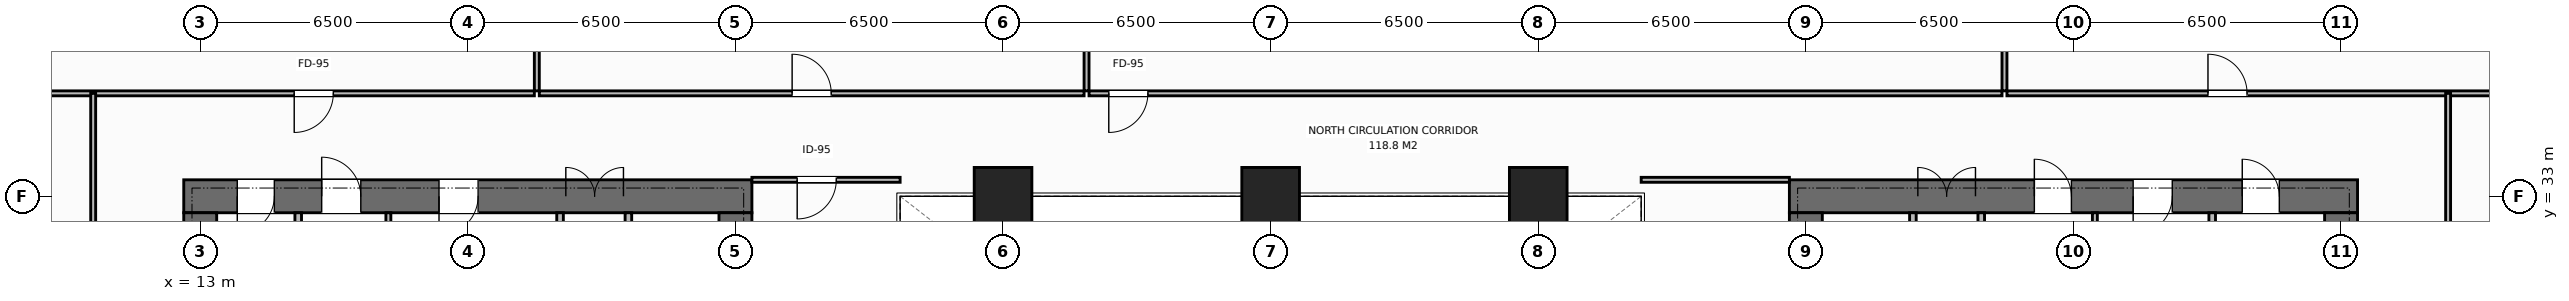
"""IFC4 building model, lengths in metres.
Left out: names, types, materials, properties, quantities, classifications, styles, units other than length and angle.
Written with IfcOpenShell. Run it as: python <this file> out.ifc"""

import sys

from ifc_helpers import new_model, si_unit, direction, frame, frame_2d, origin, origin_2d, place, context, subcontext, project, spatial, rectangle, extrude, element, fill, save


model = new_model("IFC4")
c1 = context("Model", 3, precision=1e-05, world=origin(), true_north=direction((0.0, 1.0)))
c2 = subcontext(c1, "Body", "Model", "MODEL_VIEW")
j1 = project(units=[si_unit("LENGTHUNIT", "METRE"), si_unit("PLANEANGLEUNIT", "RADIAN")], contexts=[c1])
p1 = place(None, origin())
s1 = spatial("IfcSite", under=j1, at=p1, CompositionType="ELEMENT")
p2 = place(p1, origin())
s2 = spatial("IfcBuilding", under=s1, at=p2, CompositionType="ELEMENT")
p3 = place(p2, frame((0.0, 0.0, 65.8)))
s3 = spatial("IfcBuildingStorey", under=s2, at=p3, CompositionType="ELEMENT", Elevation=65.8)
p4 = place(p3, frame((12.6, 33.0, 0.0), z_axis=(0.0, 0.0, 1.0), x_axis=(1.0, 0.0, 0.0)))
e1 = element("IfcWall", 1, at=p4, inside=s3, PredefinedType="SHEAR", context=c2, shape_type="SweptSolid", body=[
    extrude(rectangle(XDim=13.8, YDim=0.8, at=frame_2d((6.9, 0.0))), origin(), (0.0, 0.0, 1.0), 3.8),
])
p5 = place(p4, frame((1.3, 0.0, 0.0)))
e2 = element("IfcOpeningElement", 2, at=p5, cuts=e1, PredefinedType="OPENING", context=c2, shape_type="SweptSolid", body=[
    extrude(rectangle(XDim=0.9, YDim=2.15, at=frame_2d((0.45, 1.075))), frame((0.0, 0.41, 0.0), z_axis=(0.0, -1.0, 0.0), x_axis=(1.0, 0.0, 0.0)), (0.0, 0.0, 1.0), 0.82),
])
p6 = place(p4, frame((3.35, 0.0, 0.0)))
e3 = element("IfcOpeningElement", 3, at=p6, cuts=e1, PredefinedType="OPENING", context=c2, shape_type="SweptSolid", body=[
    extrude(rectangle(XDim=0.95, YDim=2.15, at=frame_2d((0.475, 1.075))), frame((0.0, 0.41, 0.0), z_axis=(0.0, -1.0, 0.0), x_axis=(1.0, 0.0, 0.0)), (0.0, 0.0, 1.0), 0.82),
])
p7 = place(p4, frame((6.2, 0.0, 0.0)))
e4 = element("IfcOpeningElement", 4, at=p7, cuts=e1, PredefinedType="OPENING", context=c2, shape_type="SweptSolid", body=[
    extrude(rectangle(XDim=0.95, YDim=2.15, at=frame_2d((0.475, 1.075))), frame((0.0, 0.41, 0.0), z_axis=(0.0, -1.0, 0.0), x_axis=(1.0, 0.0, 0.0)), (0.0, 0.0, 1.0), 0.82),
])
p8 = place(p4, frame((9.28, 0.0, 0.0)))
e5 = element("IfcOpeningElement", 5, at=p8, cuts=e1, PredefinedType="OPENING", context=c2, shape_type="SweptSolid", body=[
    extrude(rectangle(XDim=1.4, YDim=2.2, at=frame_2d((0.7, 1.1))), frame((0.0, 0.41, 0.0), z_axis=(0.0, -1.0, 0.0), x_axis=(1.0, 0.0, 0.0)), (0.0, 0.0, 1.0), 0.82),
])
p9 = place(p3, frame((13.0, 19.4, 0.0), z_axis=(0.0, 0.0, 1.0), x_axis=(0.0, 1.0, 0.0)))
e6 = element("IfcWall", 6, at=p9, inside=s3, PredefinedType="SHEAR", context=c2, shape_type="SweptSolid", body=[
    extrude(rectangle(XDim=13.2, YDim=0.8, at=frame_2d((6.6, 0.0))), origin(), (0.0, 0.0, 1.0), 3.8),
])
p10 = place(p9, frame((4.65, 0.0, 0.0)))
e7 = element("IfcOpeningElement", 7, at=p10, cuts=e6, PredefinedType="OPENING", context=c2, shape_type="SweptSolid", body=[
    extrude(rectangle(XDim=1.4, YDim=2.2, at=frame_2d((0.7, 1.1))), frame((0.0, 0.41, 0.0), z_axis=(0.0, -1.0, 0.0), x_axis=(1.0, 0.0, 0.0)), (0.0, 0.0, 1.0), 0.82),
])
p11 = place(p3, frame((26.0, 19.4, 0.0), z_axis=(0.0, 0.0, 1.0), x_axis=(0.0, 1.0, 0.0)))
e8 = element("IfcWall", 8, at=p11, inside=s3, PredefinedType="SHEAR", context=c2, shape_type="SweptSolid", body=[
    extrude(rectangle(XDim=13.2, YDim=0.8, at=frame_2d((6.6, 0.0))), origin(), (0.0, 0.0, 1.0), 3.8),
])
p12 = place(p3, frame((51.6, 33.0, 0.0), z_axis=(0.0, 0.0, 1.0), x_axis=(1.0, 0.0, 0.0)))
e9 = element("IfcWall", 9, at=p12, inside=s3, PredefinedType="SHEAR", context=c2, shape_type="SweptSolid", body=[
    extrude(rectangle(XDim=13.8, YDim=0.8, at=frame_2d((6.9, 0.0))), origin(), (0.0, 0.0, 1.0), 3.8),
])
p13 = place(p12, frame((3.12, 0.0, 0.0)))
e10 = element("IfcOpeningElement", 10, at=p13, cuts=e9, PredefinedType="OPENING", context=c2, shape_type="SweptSolid", body=[
    extrude(rectangle(XDim=1.4, YDim=2.2, at=frame_2d((0.7, 1.1))), frame((0.0, 0.41, 0.0), z_axis=(0.0, -1.0, 0.0), x_axis=(1.0, 0.0, 0.0)), (0.0, 0.0, 1.0), 0.82),
])
p14 = place(p12, frame((11.0, 0.0, 0.0)))
e11 = element("IfcOpeningElement", 11, at=p14, cuts=e9, PredefinedType="OPENING", context=c2, shape_type="SweptSolid", body=[
    extrude(rectangle(XDim=0.9, YDim=2.15, at=frame_2d((0.45, 1.075))), frame((0.0, 0.41, 0.0), z_axis=(0.0, -1.0, 0.0), x_axis=(1.0, 0.0, 0.0)), (0.0, 0.0, 1.0), 0.82),
])
p15 = place(p12, frame((5.95, 0.0, 0.0)))
e12 = element("IfcOpeningElement", 12, at=p15, cuts=e9, PredefinedType="OPENING", context=c2, shape_type="SweptSolid", body=[
    extrude(rectangle(XDim=0.9, YDim=2.15, at=frame_2d((0.45, 1.075))), frame((0.0, 0.41, 0.0), z_axis=(0.0, -1.0, 0.0), x_axis=(1.0, 0.0, 0.0)), (0.0, 0.0, 1.0), 0.82),
])
p16 = place(p12, frame((8.35, 0.0, 0.0)))
e13 = element("IfcOpeningElement", 13, at=p16, cuts=e9, PredefinedType="OPENING", context=c2, shape_type="SweptSolid", body=[
    extrude(rectangle(XDim=0.95, YDim=2.15, at=frame_2d((0.475, 1.075))), frame((0.0, 0.41, 0.0), z_axis=(0.0, -1.0, 0.0), x_axis=(1.0, 0.0, 0.0)), (0.0, 0.0, 1.0), 0.82),
])
p17 = place(p3, frame((52.0, 19.4, 0.0), z_axis=(0.0, 0.0, 1.0), x_axis=(0.0, 1.0, 0.0)))
e14 = element("IfcWall", 14, at=p17, inside=s3, PredefinedType="SHEAR", context=c2, shape_type="SweptSolid", body=[
    extrude(rectangle(XDim=13.2, YDim=0.8, at=frame_2d((6.6, 0.0))), origin(), (0.0, 0.0, 1.0), 3.8),
])
p18 = place(p3, frame((65.0, 19.4, 0.0), z_axis=(0.0, 0.0, 1.0), x_axis=(0.0, 1.0, 0.0)))
e15 = element("IfcWall", 15, at=p18, inside=s3, PredefinedType="SHEAR", context=c2, shape_type="SweptSolid", body=[
    extrude(rectangle(XDim=13.2, YDim=0.8, at=frame_2d((6.6, 0.0))), origin(), (0.0, 0.0, 1.0), 3.8),
])
p19 = place(p18, frame((8.05, 0.0, 0.0)))
e16 = element("IfcOpeningElement", 16, at=p19, cuts=e15, PredefinedType="OPENING", context=c2, shape_type="SweptSolid", body=[
    extrude(rectangle(XDim=1.3, YDim=2.2, at=frame_2d((0.65, 1.1))), frame((0.0, 0.41, 0.0), z_axis=(0.0, -1.0, 0.0), x_axis=(1.0, 0.0, 0.0)), (0.0, 0.0, 1.0), 0.82),
])
for number, where, z_axis, x_axis in (
    (17, (32.5, 33.0, 0.0), (0.0, 0.0, 1.0), (1.0, 0.0, 0.0)),
    (18, (39.0, 33.0, 0.0), (0.0, 0.0, 1.0), (1.0, 0.0, 0.0)),
    (19, (45.5, 33.0, 0.0), (0.0, 0.0, 1.0), (1.0, 0.0, 0.0)),
):
    element("IfcColumn", number, at=place(p3, frame(where, z_axis=z_axis, x_axis=x_axis)), inside=s3, PredefinedType="COLUMN", context=c2, shape_type="SweptSolid", body=[
        extrude(rectangle(XDim=1.4, YDim=1.4, at=origin_2d()), origin(), (0.0, 0.0, 1.0), 3.8),
    ])
p20 = place(p3, frame((15.38, 26.56, 0.0), z_axis=(0.0, 0.0, 1.0), x_axis=(0.0, 1.0, 0.0)))
e20 = element("IfcWall", 20, at=p20, inside=s3, PredefinedType="STANDARD", context=c2, shape_type="SweptSolid", body=[
    extrude(rectangle(XDim=6.04, YDim=0.16, at=frame_2d((3.02, 0.0))), origin(), (0.0, 0.0, 1.0), 3.55),
])
p21 = place(p3, frame((17.57, 26.56, 0.0), z_axis=(0.0, 0.0, 1.0), x_axis=(0.0, 1.0, 0.0)))
e21 = element("IfcWall", 21, at=p21, inside=s3, PredefinedType="PARTITIONING", context=c2, shape_type="SweptSolid", body=[
    extrude(rectangle(XDim=6.04, YDim=0.12, at=frame_2d((3.02, 0.0))), origin(), (0.0, 0.0, 1.0), 3.55),
])
p22 = place(p3, frame((21.74, 26.56, 0.0), z_axis=(0.0, 0.0, 1.0), x_axis=(0.0, 1.0, 0.0)))
e22 = element("IfcWall", 22, at=p22, inside=s3, PredefinedType="STANDARD", context=c2, shape_type="SweptSolid", body=[
    extrude(rectangle(XDim=6.04, YDim=0.16, at=frame_2d((3.02, 0.0))), origin(), (0.0, 0.0, 1.0), 3.55),
])
p23 = place(p3, frame((23.4, 19.4, 0.0), z_axis=(0.0, 0.0, 1.0), x_axis=(0.0, 1.0, 0.0)))
e23 = element("IfcWall", 23, at=p23, inside=s3, PredefinedType="STANDARD", context=c2, shape_type="SweptSolid", body=[
    extrude(rectangle(XDim=13.2, YDim=0.16, at=frame_2d((6.6, 0.0))), origin(), (0.0, 0.0, 1.0), 3.55),
])
p24 = place(p23, frame((0.55, 0.0, 0.0)))
e24 = element("IfcOpeningElement", 24, at=p24, cuts=e23, PredefinedType="OPENING", context=c2, shape_type="SweptSolid", body=[
    extrude(rectangle(XDim=1.1, YDim=2.2, at=frame_2d((0.55, 1.1))), frame((0.0, 0.09, 0.0), z_axis=(0.0, -1.0, 0.0), x_axis=(1.0, 0.0, 0.0)), (0.0, 0.0, 1.0), 0.18),
])
p25 = place(p23, frame((2.7, 0.0, 0.0)))
e25 = element("IfcOpeningElement", 25, at=p25, cuts=e23, PredefinedType="OPENING", context=c2, shape_type="SweptSolid", body=[
    extrude(rectangle(XDim=1.1, YDim=2.2, at=frame_2d((0.55, 1.1))), frame((0.0, 0.09, 0.0), z_axis=(0.0, -1.0, 0.0), x_axis=(1.0, 0.0, 0.0)), (0.0, 0.0, 1.0), 0.18),
])
p26 = place(p3, frame((54.6, 19.4, 0.0), z_axis=(0.0, 0.0, 1.0), x_axis=(0.0, 1.0, 0.0)))
e26 = element("IfcWall", 26, at=p26, inside=s3, PredefinedType="STANDARD", context=c2, shape_type="SweptSolid", body=[
    extrude(rectangle(XDim=13.2, YDim=0.16, at=frame_2d((6.6, 0.0))), origin(), (0.0, 0.0, 1.0), 3.55),
])
p27 = place(p26, frame((0.55, 0.0, 0.0)))
e27 = element("IfcOpeningElement", 27, at=p27, cuts=e26, PredefinedType="OPENING", context=c2, shape_type="SweptSolid", body=[
    extrude(rectangle(XDim=1.1, YDim=2.2, at=frame_2d((0.55, 1.1))), frame((0.0, 0.09, 0.0), z_axis=(0.0, -1.0, 0.0), x_axis=(1.0, 0.0, 0.0)), (0.0, 0.0, 1.0), 0.18),
])
p28 = place(p26, frame((2.7, 0.0, 0.0)))
e28 = element("IfcOpeningElement", 28, at=p28, cuts=e26, PredefinedType="OPENING", context=c2, shape_type="SweptSolid", body=[
    extrude(rectangle(XDim=1.1, YDim=2.2, at=frame_2d((0.55, 1.1))), frame((0.0, 0.09, 0.0), z_axis=(0.0, -1.0, 0.0), x_axis=(1.0, 0.0, 0.0)), (0.0, 0.0, 1.0), 0.18),
])
p29 = place(p3, frame((56.26, 23.09, 0.0), z_axis=(0.0, 0.0, 1.0), x_axis=(0.0, 1.0, 0.0)))
e29 = element("IfcWall", 29, at=p29, inside=s3, PredefinedType="STANDARD", context=c2, shape_type="SweptSolid", body=[
    extrude(rectangle(XDim=9.51, YDim=0.16, at=frame_2d((4.755, 0.0))), origin(), (0.0, 0.0, 1.0), 3.55),
])
p30 = place(p29, frame((1.01, 0.0, 0.0)))
e30 = element("IfcOpeningElement", 30, at=p30, cuts=e29, PredefinedType="OPENING", context=c2, shape_type="SweptSolid", body=[
    extrude(rectangle(XDim=1.3, YDim=2.2, at=frame_2d((0.65, 1.1))), frame((0.0, 0.09, 0.0), z_axis=(0.0, -1.0, 0.0), x_axis=(1.0, 0.0, 0.0)), (0.0, 0.0, 1.0), 0.18),
])
p31 = place(p3, frame((61.87, 26.56, 0.0), z_axis=(0.0, 0.0, 1.0), x_axis=(0.0, 1.0, 0.0)))
e31 = element("IfcWall", 31, at=p31, inside=s3, PredefinedType="STANDARD", context=c2, shape_type="SweptSolid", body=[
    extrude(rectangle(XDim=6.04, YDim=0.16, at=frame_2d((3.02, 0.0))), origin(), (0.0, 0.0, 1.0), 3.55),
])
p32 = place(p3, frame((59.02, 26.56, 0.0), z_axis=(0.0, 0.0, 1.0), x_axis=(0.0, 1.0, 0.0)))
e32 = element("IfcWall", 32, at=p32, inside=s3, PredefinedType="PARTITIONING", context=c2, shape_type="SweptSolid", body=[
    extrude(rectangle(XDim=6.04, YDim=0.12, at=frame_2d((3.02, 0.0))), origin(), (0.0, 0.0, 1.0), 3.55),
])
p33 = place(p3, frame((26.4, 33.4, 0.0), z_axis=(0.0, 0.0, 1.0), x_axis=(1.0, 0.0, 0.0)))
e33 = element("IfcWall", 33, at=p33, inside=s3, PredefinedType="PARTITIONING", context=c2, shape_type="SweptSolid", body=[
    extrude(rectangle(XDim=3.6, YDim=0.12, at=frame_2d((1.8, 0.0))), origin(), (0.0, 0.0, 1.0), 3.55),
])
p34 = place(p33, frame((1.1, 0.0, 0.0)))
e34 = element("IfcOpeningElement", 34, at=p34, cuts=e33, PredefinedType="OPENING", context=c2, shape_type="SweptSolid", body=[
    extrude(rectangle(XDim=0.95, YDim=2.15, at=frame_2d((0.475, 1.075))), frame((0.0, 0.07, 0.0), z_axis=(0.0, -1.0, 0.0), x_axis=(1.0, 0.0, 0.0)), (0.0, 0.0, 1.0), 0.14),
])
p35 = place(p3, frame((48.0, 33.4, 0.0), z_axis=(0.0, 0.0, 1.0), x_axis=(1.0, 0.0, 0.0)))
e35 = element("IfcWall", 35, at=p35, inside=s3, PredefinedType="PARTITIONING", context=c2, shape_type="SweptSolid", body=[
    extrude(rectangle(XDim=3.6, YDim=0.12, at=frame_2d((1.8, 0.0))), origin(), (0.0, 0.0, 1.0), 3.55),
])
p36 = place(p3, frame((21.176, 35.56, 0.0), z_axis=(0.0, 0.0, 1.0), x_axis=(0.0, 1.0, 0.0)))
e36 = element("IfcWall", 36, at=p36, inside=s3, PredefinedType="PARTITIONING", context=c2, shape_type="SweptSolid", body=[
    extrude(rectangle(XDim=16.42, YDim=0.12, at=frame_2d((8.21, 0.0))), origin(), (0.0, 0.0, 1.0), 3.55),
])
p37 = place(p3, frame((-0.02, 35.5, 0.0), z_axis=(0.0, 0.0, 1.0), x_axis=(1.0, 0.0, 0.0)))
e37 = element("IfcWall", 37, at=p37, inside=s3, PredefinedType="PARTITIONING", context=c2, shape_type="SweptSolid", body=[
    extrude(rectangle(XDim=21.136, YDim=0.12, at=frame_2d((10.568, 0.0))), origin(), (0.0, 0.0, 1.0), 3.55),
])
p38 = place(p37, frame((15.303, 0.0, 0.0)))
e38 = element("IfcOpeningElement", 38, at=p38, cuts=e37, PredefinedType="OPENING", context=c2, shape_type="SweptSolid", body=[
    extrude(rectangle(XDim=0.95, YDim=2.15, at=frame_2d((0.475, 1.075))), frame((0.0, 0.07, 0.0), z_axis=(0.0, -1.0, 0.0), x_axis=(1.0, 0.0, 0.0)), (0.0, 0.0, 1.0), 0.14),
])
p39 = place(p3, frame((34.528, 35.56, 0.0), z_axis=(0.0, 0.0, 1.0), x_axis=(0.0, 1.0, 0.0)))
e39 = element("IfcWall", 39, at=p39, inside=s3, PredefinedType="PARTITIONING", context=c2, shape_type="SweptSolid", body=[
    extrude(rectangle(XDim=16.42, YDim=0.12, at=frame_2d((8.21, 0.0))), origin(), (0.0, 0.0, 1.0), 3.55),
])
p40 = place(p3, frame((21.236, 35.5, 0.0), z_axis=(0.0, 0.0, 1.0), x_axis=(1.0, 0.0, 0.0)))
e40 = element("IfcWall", 40, at=p40, inside=s3, PredefinedType="PARTITIONING", context=c2, shape_type="SweptSolid", body=[
    extrude(rectangle(XDim=13.233, YDim=0.12, at=frame_2d((6.616, 0.0))), origin(), (0.0, 0.0, 1.0), 3.55),
])
p41 = place(p40, frame((6.141, 0.0, 0.0)))
e41 = element("IfcOpeningElement", 41, at=p41, cuts=e40, PredefinedType="OPENING", context=c2, shape_type="SweptSolid", body=[
    extrude(rectangle(XDim=0.95, YDim=2.15, at=frame_2d((0.475, 1.075))), frame((0.0, 0.07, 0.0), z_axis=(0.0, -1.0, 0.0), x_axis=(1.0, 0.0, 0.0)), (0.0, 0.0, 1.0), 0.14),
])
p42 = place(p3, frame((56.824, 35.56, 0.0), z_axis=(0.0, 0.0, 1.0), x_axis=(0.0, 1.0, 0.0)))
e42 = element("IfcWall", 42, at=p42, inside=s3, PredefinedType="PARTITIONING", context=c2, shape_type="SweptSolid", body=[
    extrude(rectangle(XDim=16.42, YDim=0.12, at=frame_2d((8.21, 0.0))), origin(), (0.0, 0.0, 1.0), 3.55),
])
p43 = place(p3, frame((34.588, 35.5, 0.0), z_axis=(0.0, 0.0, 1.0), x_axis=(1.0, 0.0, 0.0)))
e43 = element("IfcWall", 43, at=p43, inside=s3, PredefinedType="PARTITIONING", context=c2, shape_type="SweptSolid", body=[
    extrude(rectangle(XDim=22.176, YDim=0.12, at=frame_2d((11.088, 0.0))), origin(), (0.0, 0.0, 1.0), 3.55),
])
p44 = place(p43, frame((0.48, 0.0, 0.0)))
e44 = element("IfcOpeningElement", 44, at=p44, cuts=e43, PredefinedType="OPENING", context=c2, shape_type="SweptSolid", body=[
    extrude(rectangle(XDim=0.95, YDim=2.15, at=frame_2d((0.475, 1.075))), frame((0.0, 0.07, 0.0), z_axis=(0.0, -1.0, 0.0), x_axis=(1.0, 0.0, 0.0)), (0.0, 0.0, 1.0), 0.14),
])
p45 = place(p3, frame((56.884, 35.5, 0.0), z_axis=(0.0, 0.0, 1.0), x_axis=(1.0, 0.0, 0.0)))
e45 = element("IfcWall", 45, at=p45, inside=s3, PredefinedType="PARTITIONING", context=c2, shape_type="SweptSolid", body=[
    extrude(rectangle(XDim=21.136, YDim=0.12, at=frame_2d((10.568, 0.0))), origin(), (0.0, 0.0, 1.0), 3.55),
])
p46 = place(p45, frame((4.883, 0.0, 0.0)))
e46 = element("IfcOpeningElement", 46, at=p46, cuts=e45, PredefinedType="OPENING", context=c2, shape_type="SweptSolid", body=[
    extrude(rectangle(XDim=0.95, YDim=2.15, at=frame_2d((0.475, 1.075))), frame((0.0, 0.07, 0.0), z_axis=(0.0, -1.0, 0.0), x_axis=(1.0, 0.0, 0.0)), (0.0, 0.0, 1.0), 0.14),
])
p47 = place(p3, frame((10.4, 18.6, 0.0), z_axis=(0.0, 0.0, 1.0), x_axis=(0.0, 1.0, 0.0)))
e47 = element("IfcWall", 47, at=p47, inside=s3, PredefinedType="PARTITIONING", context=c2, shape_type="SweptSolid", body=[
    extrude(rectangle(XDim=16.9, YDim=0.12, at=frame_2d((8.45, 0.0))), origin(), (0.0, 0.0, 1.0), 3.55),
])
p48 = place(p47, frame((6.925, 0.0, 0.0)))
e48 = element("IfcOpeningElement", 48, at=p48, cuts=e47, PredefinedType="OPENING", context=c2, shape_type="SweptSolid", body=[
    extrude(rectangle(XDim=0.95, YDim=2.15, at=frame_2d((0.475, 1.075))), frame((0.0, 0.07, 0.0), z_axis=(0.0, -1.0, 0.0), x_axis=(1.0, 0.0, 0.0)), (0.0, 0.0, 1.0), 0.14),
])
p49 = place(p3, frame((67.6, 26.0, 0.0), z_axis=(0.0, 0.0, 1.0), x_axis=(0.0, 1.0, 0.0)))
e49 = element("IfcWall", 49, at=p49, inside=s3, PredefinedType="PARTITIONING", context=c2, shape_type="SweptSolid", body=[
    extrude(rectangle(XDim=9.5, YDim=0.12, at=frame_2d((4.75, 0.0))), origin(), (0.0, 0.0, 1.0), 3.55),
])
p50 = place(p49, frame((3.225, 0.0, 0.0)))
e50 = element("IfcOpeningElement", 50, at=p50, cuts=e49, PredefinedType="OPENING", context=c2, shape_type="SweptSolid", body=[
    extrude(rectangle(XDim=0.95, YDim=2.15, at=frame_2d((0.475, 1.075))), frame((0.0, 0.07, 0.0), z_axis=(0.0, -1.0, 0.0), x_axis=(1.0, 0.0, 0.0)), (0.0, 0.0, 1.0), 0.14),
])
p51 = place(p5, origin())
e51 = element("IfcDoor", 51, at=p51, inside=s3, OperationType="SINGLE_SWING_RIGHT", PredefinedType="DOOR", context=c2, shape_type="SweptSolid", body=[
    extrude(rectangle(XDim=0.9, YDim=2.15, at=frame_2d((0.45, 1.075))), frame((0.0, -0.075, 0.0), z_axis=(0.0, -1.0, 0.0), x_axis=(1.0, 0.0, 0.0)), (0.0, 0.0, 1.0), 0.05),
])
fill(e2, e51)
p52 = place(p6, origin())
e52 = element("IfcDoor", 52, at=p52, inside=s3, OperationType="SINGLE_SWING_LEFT", PredefinedType="DOOR", context=c2, shape_type="SweptSolid", body=[
    extrude(rectangle(XDim=0.95, YDim=2.15, at=frame_2d((0.475, 1.075))), frame((0.0, -0.075, 0.0), z_axis=(0.0, -1.0, 0.0), x_axis=(1.0, 0.0, 0.0)), (0.0, 0.0, 1.0), 0.05),
])
fill(e3, e52)
p53 = place(p7, origin())
e53 = element("IfcDoor", 53, at=p53, inside=s3, OperationType="SINGLE_SWING_RIGHT", PredefinedType="DOOR", context=c2, shape_type="SweptSolid", body=[
    extrude(rectangle(XDim=0.95, YDim=2.15, at=frame_2d((0.475, 1.075))), frame((0.0, -0.075, 0.0), z_axis=(0.0, -1.0, 0.0), x_axis=(1.0, 0.0, 0.0)), (0.0, 0.0, 1.0), 0.05),
])
fill(e4, e53)
p54 = place(p8, origin())
e54 = element("IfcDoor", 54, at=p54, inside=s3, OperationType="DOUBLE_DOOR_SINGLE_SWING", PredefinedType="DOOR", context=c2, shape_type="SweptSolid", body=[
    extrude(rectangle(XDim=1.4, YDim=2.2, at=frame_2d((0.7, 1.1))), frame((0.0, -0.075, 0.0), z_axis=(0.0, -1.0, 0.0), x_axis=(1.0, 0.0, 0.0)), (0.0, 0.0, 1.0), 0.05),
])
fill(e5, e54)
p55 = place(p13, origin())
e55 = element("IfcDoor", 55, at=p55, inside=s3, OperationType="DOUBLE_DOOR_SINGLE_SWING", PredefinedType="DOOR", context=c2, shape_type="SweptSolid", body=[
    extrude(rectangle(XDim=1.4, YDim=2.2, at=frame_2d((0.7, 1.1))), frame((0.0, -0.075, 0.0), z_axis=(0.0, -1.0, 0.0), x_axis=(1.0, 0.0, 0.0)), (0.0, 0.0, 1.0), 0.05),
])
fill(e10, e55)
p56 = place(p14, origin())
e56 = element("IfcDoor", 56, at=p56, inside=s3, OperationType="SINGLE_SWING_LEFT", PredefinedType="DOOR", context=c2, shape_type="SweptSolid", body=[
    extrude(rectangle(XDim=0.9, YDim=2.15, at=frame_2d((0.45, 1.075))), frame((0.0, -0.075, 0.0), z_axis=(0.0, -1.0, 0.0), x_axis=(1.0, 0.0, 0.0)), (0.0, 0.0, 1.0), 0.05),
])
fill(e11, e56)
p57 = place(p15, origin())
e57 = element("IfcDoor", 57, at=p57, inside=s3, OperationType="SINGLE_SWING_LEFT", PredefinedType="DOOR", context=c2, shape_type="SweptSolid", body=[
    extrude(rectangle(XDim=0.9, YDim=2.15, at=frame_2d((0.45, 1.075))), frame((0.0, -0.075, 0.0), z_axis=(0.0, -1.0, 0.0), x_axis=(1.0, 0.0, 0.0)), (0.0, 0.0, 1.0), 0.05),
])
fill(e12, e57)
p58 = place(p16, origin())
e58 = element("IfcDoor", 58, at=p58, inside=s3, OperationType="SINGLE_SWING_RIGHT", PredefinedType="DOOR", context=c2, shape_type="SweptSolid", body=[
    extrude(rectangle(XDim=0.95, YDim=2.15, at=frame_2d((0.475, 1.075))), frame((0.0, -0.075, 0.0), z_axis=(0.0, -1.0, 0.0), x_axis=(1.0, 0.0, 0.0)), (0.0, 0.0, 1.0), 0.05),
])
fill(e13, e58)
p59 = place(p34, origin())
e59 = element("IfcDoor", 59, at=p59, inside=s3, OperationType="SINGLE_SWING_RIGHT", PredefinedType="DOOR", context=c2, shape_type="SweptSolid", body=[
    extrude(rectangle(XDim=0.95, YDim=2.15, at=frame_2d((0.475, 1.075))), frame((0.0, 0.025, 0.0), z_axis=(0.0, -1.0, 0.0), x_axis=(1.0, 0.0, 0.0)), (0.0, 0.0, 1.0), 0.05),
])
fill(e34, e59)
p60 = place(p38, origin())
e60 = element("IfcDoor", 60, at=p60, inside=s3, OperationType="SINGLE_SWING_RIGHT", PredefinedType="DOOR", context=c2, shape_type="SweptSolid", body=[
    extrude(rectangle(XDim=0.95, YDim=2.15, at=frame_2d((0.475, 1.075))), frame((0.0, 0.025, 0.0), z_axis=(0.0, -1.0, 0.0), x_axis=(1.0, 0.0, 0.0)), (0.0, 0.0, 1.0), 0.05),
])
fill(e38, e60)
p61 = place(p41, origin())
e61 = element("IfcDoor", 61, at=p61, inside=s3, OperationType="SINGLE_SWING_LEFT", PredefinedType="DOOR", context=c2, shape_type="SweptSolid", body=[
    extrude(rectangle(XDim=0.95, YDim=2.15, at=frame_2d((0.475, 1.075))), frame((0.0, 0.025, 0.0), z_axis=(0.0, -1.0, 0.0), x_axis=(1.0, 0.0, 0.0)), (0.0, 0.0, 1.0), 0.05),
])
fill(e41, e61)
p62 = place(p44, origin())
e62 = element("IfcDoor", 62, at=p62, inside=s3, OperationType="SINGLE_SWING_RIGHT", PredefinedType="DOOR", context=c2, shape_type="SweptSolid", body=[
    extrude(rectangle(XDim=0.95, YDim=2.15, at=frame_2d((0.475, 1.075))), frame((0.0, 0.025, 0.0), z_axis=(0.0, -1.0, 0.0), x_axis=(1.0, 0.0, 0.0)), (0.0, 0.0, 1.0), 0.05),
])
fill(e44, e62)
p63 = place(p46, origin())
e63 = element("IfcDoor", 63, at=p63, inside=s3, OperationType="SINGLE_SWING_LEFT", PredefinedType="DOOR", context=c2, shape_type="SweptSolid", body=[
    extrude(rectangle(XDim=0.95, YDim=2.15, at=frame_2d((0.475, 1.075))), frame((0.0, 0.025, 0.0), z_axis=(0.0, -1.0, 0.0), x_axis=(1.0, 0.0, 0.0)), (0.0, 0.0, 1.0), 0.05),
])
fill(e46, e63)
save(model, sys.argv[1])
